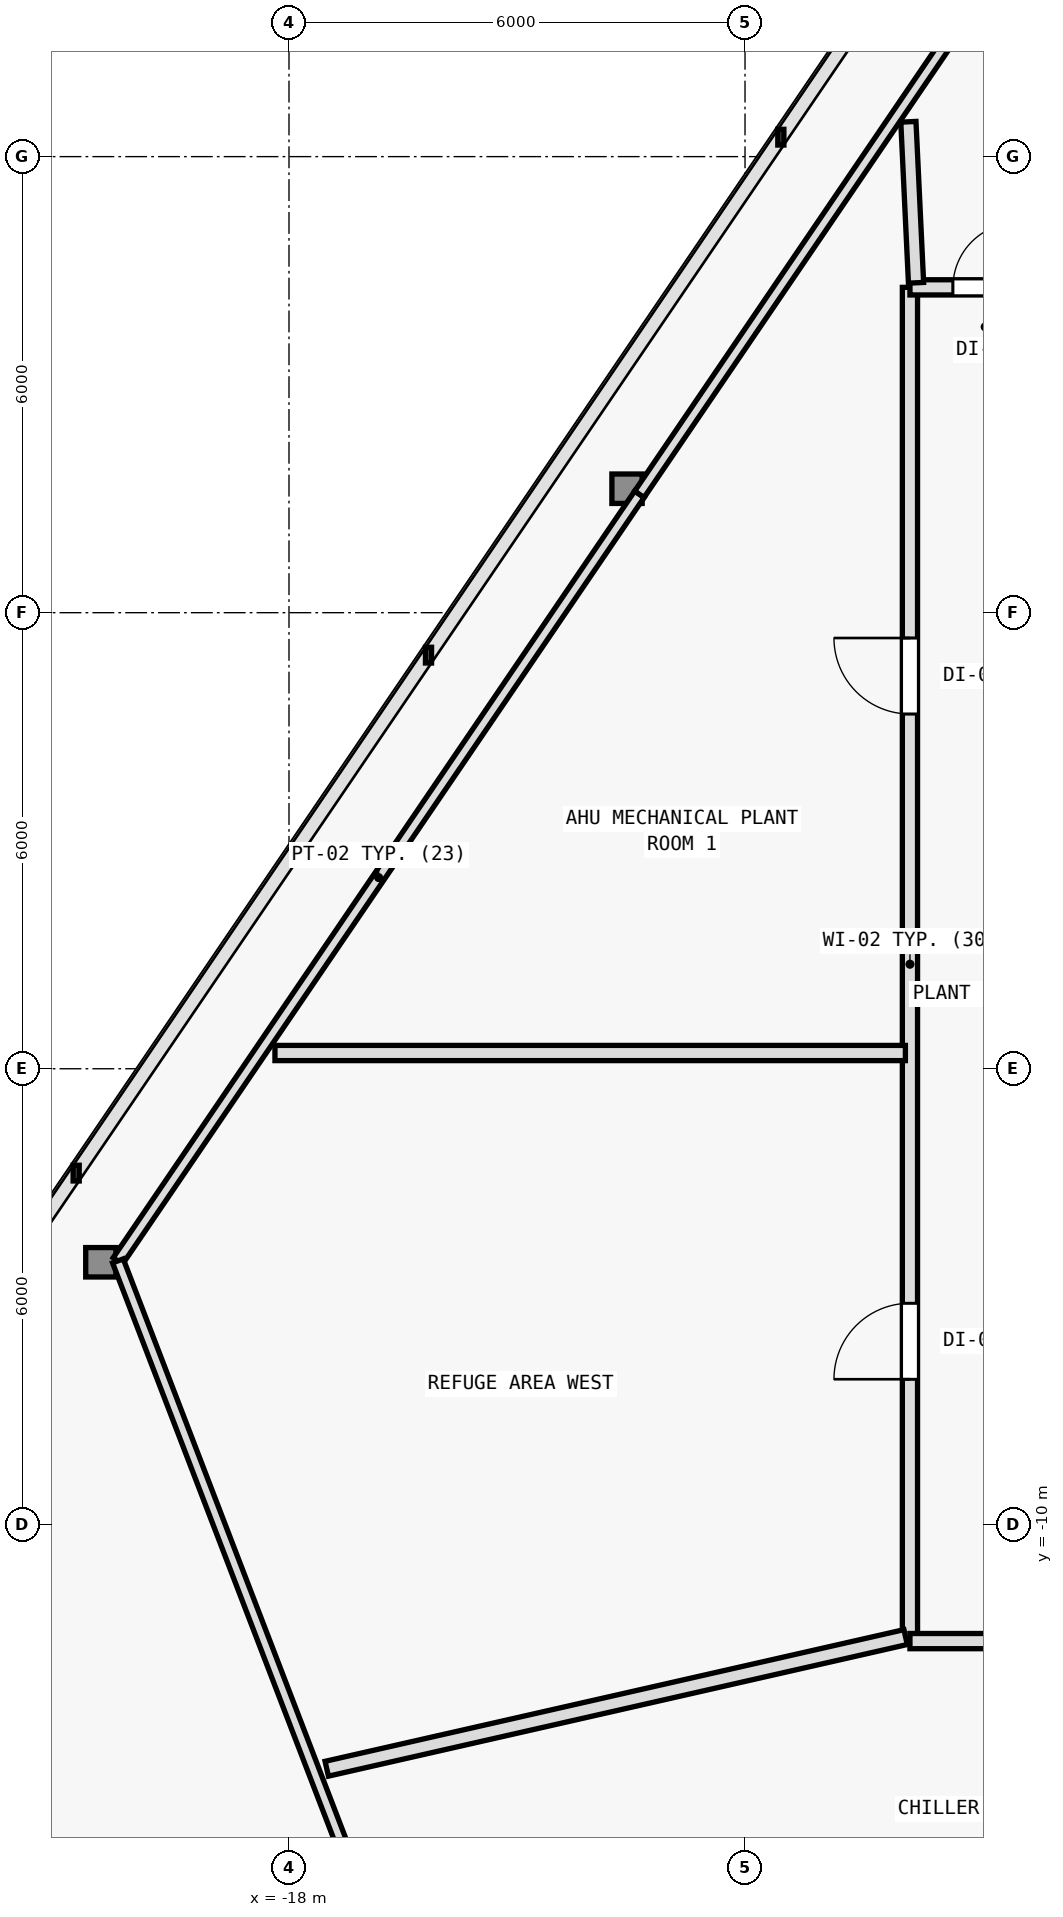
"""IFC4 building model, lengths in metres.
Left out: names, types, materials, properties, quantities, classifications, styles, units other than length and angle.
Written with IfcOpenShell. Run it as: python <this file> out.ifc"""

import sys

from ifc_helpers import new_model, si_unit, direction, frame, frame_2d, origin, origin_2d, place, context, subcontext, project, spatial, rectangle, i_section, extrude, element, fill, save


model = new_model("IFC4")
c1 = context("Model", 3, precision=1e-05, world=origin(), true_north=direction((0.0, 1.0)))
c2 = subcontext(c1, "Body", "Model", "MODEL_VIEW")
j1 = project(units=[si_unit("LENGTHUNIT", "METRE"), si_unit("PLANEANGLEUNIT", "RADIAN")], contexts=[c1])
p1 = place(None, origin())
s1 = spatial("IfcSite", under=j1, at=p1, CompositionType="ELEMENT")
p2 = place(p1, origin())
s2 = spatial("IfcBuilding", under=s1, at=p2, CompositionType="ELEMENT")
p3 = place(p2, frame((0.0, 0.0, 185.4)))
s3 = spatial("IfcBuildingStorey", under=s2, at=p3, CompositionType="ELEMENT", Elevation=185.4)
p4 = place(p3, frame((-13.552, 3.631, 0.006), z_axis=(0.012794303817, 0.007136265077, 0.999892683997), x_axis=(-0.487119351792, 0.873335409284, 0.0)))
e1 = element("IfcColumn", 1, at=p4, inside=s3, PredefinedType="COLUMN", context=c2, shape_type="SweptSolid", body=[
    extrude(i_section(OverallWidth=0.398, OverallDepth=0.387, WebThickness=0.013, FlangeThickness=0.022, FilletRadius=0.015, at=origin_2d()), origin(), (0.0, 0.0, 1.0), 4.79),
])
p5 = place(p3, frame((-20.476, -6.546, 0.006), z_axis=(0.018907266959, 0.016206228822, 0.999689888617), x_axis=(-0.650791373456, 0.759256602365, 0.0)))
e2 = element("IfcColumn", 2, at=p5, inside=s3, PredefinedType="COLUMN", context=c2, shape_type="SweptSolid", body=[
    extrude(i_section(OverallWidth=0.398, OverallDepth=0.387, WebThickness=0.013, FlangeThickness=0.022, FilletRadius=0.015, at=origin_2d()), origin(), (0.0, 0.0, 1.0), 4.791),
])
p6 = place(p3, frame((-20.251, -6.528, 0.0), z_axis=(0.0, 0.0, 1.0), x_axis=(0.562462741566, 0.826822631736, 0.0)))
e3 = element("IfcWall", 3, at=p6, inside=s3, PredefinedType="PARTITIONING", context=c2, shape_type="SweptSolid", body=[
    extrude(rectangle(XDim=12.199, YDim=0.15, at=frame_2d((6.099, 0.0))), origin(), (0.0, 0.0, 1.0), 3.975),
])
p7 = place(p3, frame((-13.39, 3.558, 0.0), z_axis=(0.0, 0.0, 1.0), x_axis=(0.562463299975, 0.826822251867, 0.0)))
e4 = element("IfcWall", 4, at=p7, inside=s3, PredefinedType="PARTITIONING", context=c2, shape_type="SweptSolid", body=[
    extrude(rectangle(XDim=12.198, YDim=0.15, at=frame_2d((6.099, 0.0))), origin(), (0.0, 0.0, 1.0), 4.085),
])
p8 = place(p3, frame((-17.038, -14.894, 0.0), z_axis=(0.0, 0.0, 1.0), x_axis=(-0.358504404651, 0.933528034847, 0.0)))
e5 = element("IfcWall", 5, at=p8, inside=s3, PredefinedType="PARTITIONING", context=c2, shape_type="SweptSolid", body=[
    extrude(rectangle(XDim=8.962, YDim=0.15, at=frame_2d((4.481, 0.0))), origin(), (0.0, 0.0, 1.0), 3.975),
])
p9 = place(p3, frame((-9.83, -11.53, 0.0), z_axis=(0.0, 0.0, 1.0), x_axis=(0.0, 1.0, 0.0)))
e6 = element("IfcWall", 6, at=p9, inside=s3, PredefinedType="SOLIDWALL", context=c2, shape_type="SweptSolid", body=[
    extrude(rectangle(XDim=17.81, YDim=0.2, at=frame_2d((8.905, 0.0))), origin(), (0.0, 0.0, 1.0), 3.975),
])
p10 = place(p9, frame((12.197, 0.0, 0.0)))
e7 = element("IfcOpeningElement", 7, at=p10, cuts=e6, PredefinedType="OPENING", context=c2, shape_type="SweptSolid", body=[
    extrude(rectangle(XDim=1.0, YDim=2.15, at=frame_2d((0.5, 1.075))), frame((0.0, 0.11, 0.0), z_axis=(0.0, -1.0, 0.0), x_axis=(1.0, 0.0, 0.0)), (0.0, 0.0, 1.0), 0.22),
])
p11 = place(p9, frame((3.445, 0.0, 0.0)))
e8 = element("IfcOpeningElement", 8, at=p11, cuts=e6, PredefinedType="OPENING", context=c2, shape_type="SweptSolid", body=[
    extrude(rectangle(XDim=1.0, YDim=2.15, at=frame_2d((0.5, 1.075))), frame((0.0, 0.11, 0.0), z_axis=(0.0, -1.0, 0.0), x_axis=(1.0, 0.0, 0.0)), (0.0, 0.0, 1.0), 0.22),
])
p12 = place(p3, frame((-9.83, 6.28, 0.0), z_axis=(0.0, 0.0, 1.0), x_axis=(1.0, 0.0, 0.0)))
e9 = element("IfcWall", 9, at=p12, inside=s3, PredefinedType="SOLIDWALL", context=c2, shape_type="SweptSolid", body=[
    extrude(rectangle(XDim=1.88, YDim=0.2, at=frame_2d((0.94, 0.0))), origin(), (0.0, 0.0, 1.0), 4.5),
])
p13 = place(p12, frame((0.565, 0.0, 0.0)))
e10 = element("IfcOpeningElement", 10, at=p13, cuts=e9, PredefinedType="OPENING", context=c2, shape_type="SweptSolid", body=[
    extrude(rectangle(XDim=0.85, YDim=2.1, at=frame_2d((0.425, 1.05))), frame((0.0, 0.11, 0.0), z_axis=(0.0, -1.0, 0.0), x_axis=(1.0, 0.0, 0.0)), (0.0, 0.0, 1.0), 0.22),
])
p14 = place(p3, frame((-9.83, -11.53, 0.0), z_axis=(0.0, 0.0, 1.0), x_axis=(1.0, 0.0, 0.0)))
e11 = element("IfcWall", 11, at=p14, inside=s3, PredefinedType="SOLIDWALL", context=c2, shape_type="SweptSolid", body=[
    extrude(rectangle(XDim=19.66, YDim=0.2, at=frame_2d((9.83, 0.0))), origin(), (0.0, 0.0, 1.0), 4.145),
])
p15 = place(p14, frame((2.928, 0.0, 0.0)))
e12 = element("IfcOpeningElement", 12, at=p15, cuts=e11, PredefinedType="OPENING", context=c2, shape_type="SweptSolid", body=[
    extrude(rectangle(XDim=1.0, YDim=2.15, at=frame_2d((0.5, 1.075))), frame((0.0, 0.11, 0.0), z_axis=(0.0, -1.0, 0.0), x_axis=(1.0, 0.0, 0.0)), (0.0, 0.0, 1.0), 0.22),
])
p16 = place(p14, frame((12.604, 0.0, 0.0)))
e13 = element("IfcOpeningElement", 13, at=p16, cuts=e11, PredefinedType="OPENING", context=c2, shape_type="SweptSolid", body=[
    extrude(rectangle(XDim=1.0, YDim=2.15, at=frame_2d((0.5, 1.075))), frame((0.0, 0.11, 0.0), z_axis=(0.0, -1.0, 0.0), x_axis=(1.0, 0.0, 0.0)), (0.0, 0.0, 1.0), 0.22),
])
p17 = place(p3, frame((-9.89, -3.793, 0.0), z_axis=(0.0, 0.0, 1.0), x_axis=(-1.0, 0.0, 0.0)))
e14 = element("IfcWall", 14, at=p17, inside=s3, PredefinedType="SOLIDWALL", context=c2, shape_type="SweptSolid", body=[
    extrude(rectangle(XDim=8.295, YDim=0.2, at=frame_2d((4.147, 0.0))), origin(), (0.0, 0.0, 1.0), 4.115),
])
p18 = place(p3, frame((-9.887, -11.477, 0.0), z_axis=(0.0, 0.0, 1.0), x_axis=(-0.975104291442, -0.22174674927, 0.0)))
e15 = element("IfcWall", 15, at=p18, inside=s3, PredefinedType="SOLIDWALL", context=c2, shape_type="SweptSolid", body=[
    extrude(rectangle(XDim=7.81, YDim=0.2, at=frame_2d((3.905, 0.0))), origin(), (0.0, 0.0, 1.0), 4.085),
])
p19 = place(p3, frame((-9.75, 6.34, 0.0), z_axis=(0.0, 0.0, 1.0), x_axis=(-0.04742841437, 0.998874639537, 0.0)))
e16 = element("IfcWall", 16, at=p19, inside=s3, PredefinedType="SOLIDWALL", context=c2, shape_type="SweptSolid", body=[
    extrude(rectangle(XDim=2.121, YDim=0.2, at=frame_2d((1.061, 0.0))), origin(), (0.0, 0.0, 1.0), 4.5),
])
p20 = place(p10, origin())
e17 = element("IfcDoor", 17, at=p20, inside=s3, OperationType="SINGLE_SWING_RIGHT", PredefinedType="DOOR", context=c2, shape_type="SweptSolid", body=[
    extrude(rectangle(XDim=1.0, YDim=2.15, at=frame_2d((0.5, 1.075))), frame((0.0, 0.025, 0.0), z_axis=(0.0, -1.0, 0.0), x_axis=(1.0, 0.0, 0.0)), (0.0, 0.0, 1.0), 0.05),
])
fill(e7, e17)
p21 = place(p11, origin())
e18 = element("IfcDoor", 18, at=p21, inside=s3, OperationType="SINGLE_SWING_LEFT", PredefinedType="DOOR", context=c2, shape_type="SweptSolid", body=[
    extrude(rectangle(XDim=1.0, YDim=2.15, at=frame_2d((0.5, 1.075))), frame((0.0, 0.025, 0.0), z_axis=(0.0, -1.0, 0.0), x_axis=(1.0, 0.0, 0.0)), (0.0, 0.0, 1.0), 0.05),
])
fill(e8, e18)
p22 = place(p13, origin())
e19 = element("IfcDoor", 19, at=p22, inside=s3, OperationType="SINGLE_SWING_RIGHT", PredefinedType="DOOR", context=c2, shape_type="SweptSolid", body=[
    extrude(rectangle(XDim=0.85, YDim=2.1, at=frame_2d((0.425, 1.05))), frame((0.0, 0.025, 0.0), z_axis=(0.0, -1.0, 0.0), x_axis=(1.0, 0.0, 0.0)), (0.0, 0.0, 1.0), 0.05),
])
fill(e10, e19)
save(model, sys.argv[1])
